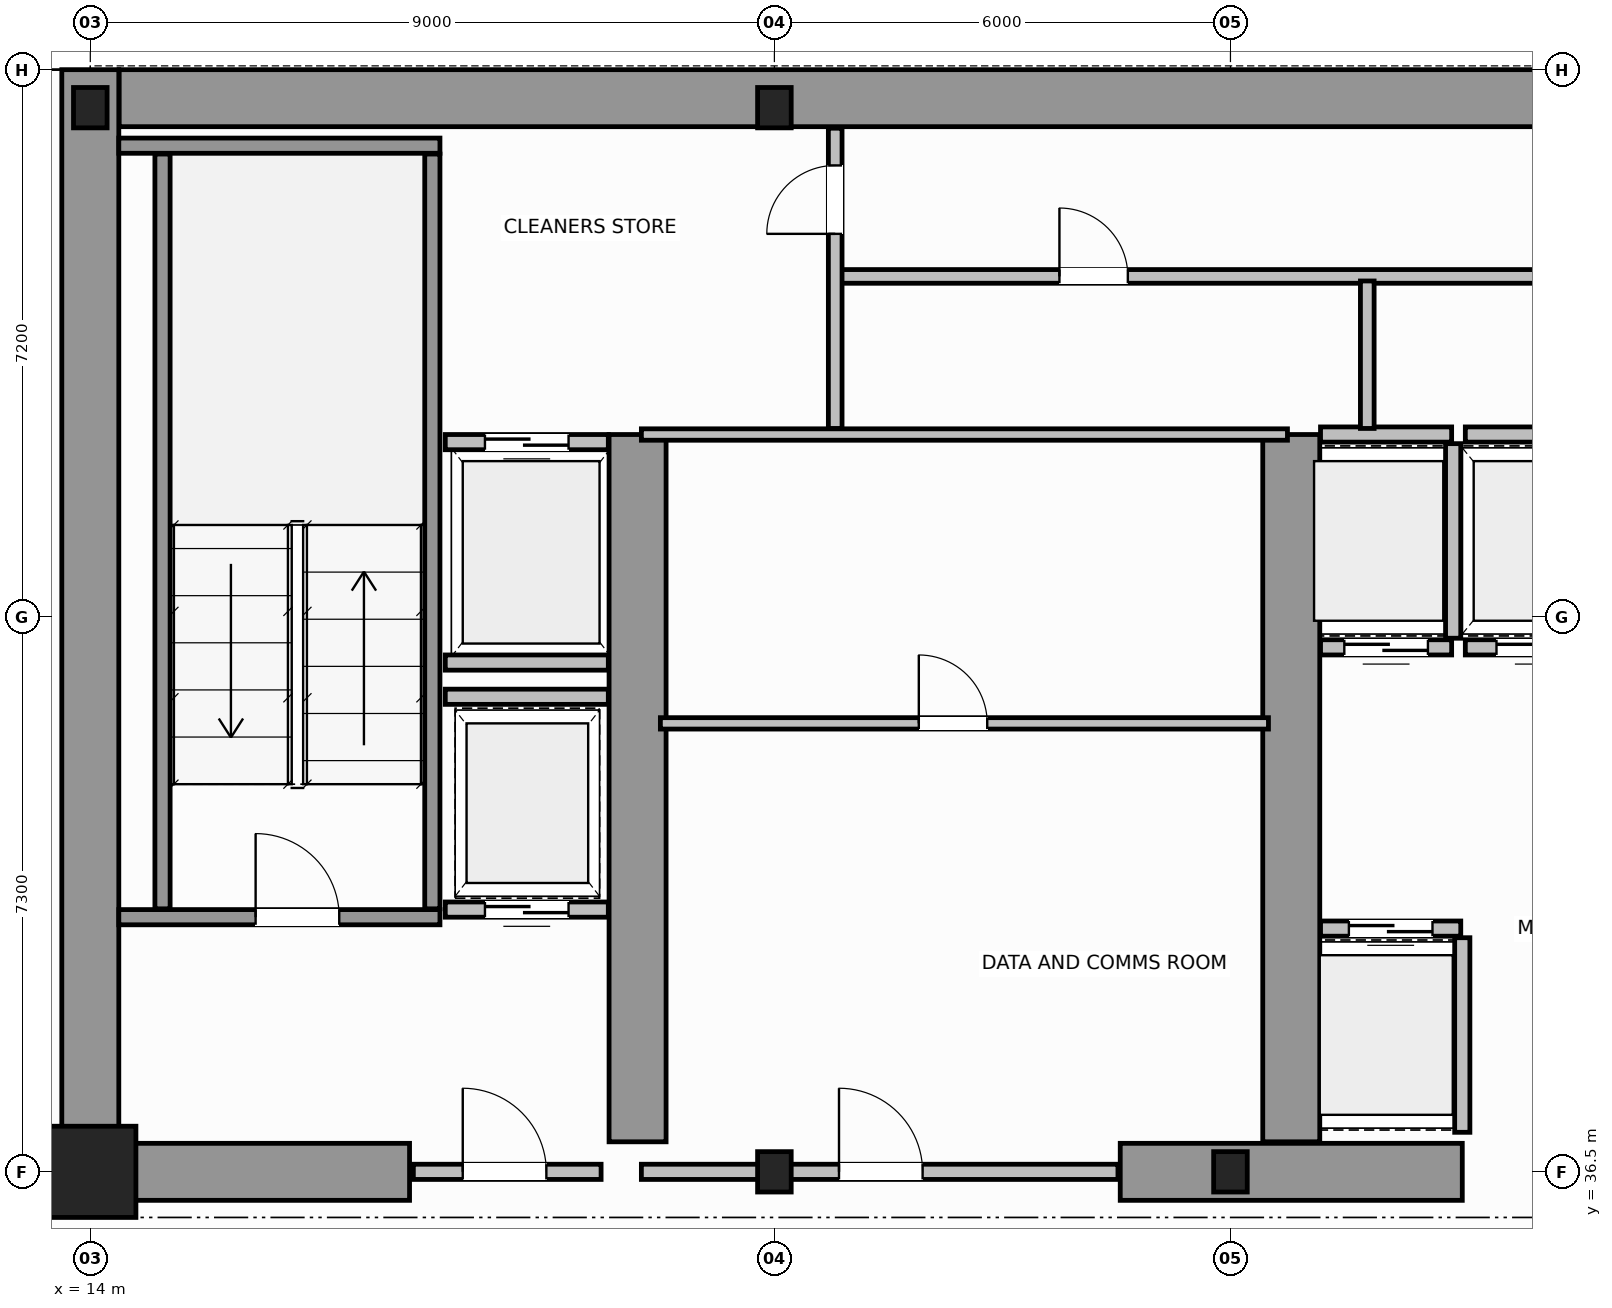
"""IFC4 building model, lengths in metres.
Left out: names, types, materials, properties, quantities, classifications, styles, units other than length and angle.
Written with IfcOpenShell. Run it as: python <this file> out.ifc"""

import sys

from ifc_helpers import new_model, si_unit, direction, frame, frame_2d, origin, origin_2d, place, context, subcontext, project, spatial, rectangle, i_section, extrude, source, transform, mapped, element, fill, save


model = new_model("IFC4")
c1 = context("Model", 3, precision=1e-05, world=origin(), true_north=direction((0.0, 1.0)))
c2 = subcontext(c1, "Body", "Model", "MODEL_VIEW")
j1 = project(units=[si_unit("LENGTHUNIT", "METRE"), si_unit("PLANEANGLEUNIT", "RADIAN")], contexts=[c1])
p1 = place(None, origin())
s1 = spatial("IfcSite", under=j1, at=p1, CompositionType="ELEMENT")
p2 = place(p1, origin())
s2 = spatial("IfcBuilding", under=s1, at=p2, CompositionType="ELEMENT")
p3 = place(p2, frame((0.0, 0.0, 137.6)))
s3 = spatial("IfcBuildingStorey", under=s2, at=p3, CompositionType="ELEMENT", Elevation=137.6)
m1 = source(origin(), c2, "Body", "SweptSolid", [
    extrude(rectangle(XDim=1.2, YDim=1.2, at=origin_2d()), origin(), (0.0, 0.0, 1.0), 3.8),
])
p4 = place(p3, frame((14.0, 36.5, 0.0), z_axis=(0.0, 0.0, 1.0), x_axis=(1.0, 0.0, 0.0)))
e1 = element("IfcColumn", 1, at=p4, inside=s3, PredefinedType="COLUMN", context=c2, shape_type="MappedRepresentation", body=[
    mapped(m1, transform((0.0, 0.0, 0.0), scale=1.0)),
])
m2 = source(origin(), c2, "Body", "SweptSolid", [
    extrude(i_section(OverallWidth=0.442, OverallDepth=0.531, WebThickness=0.065, FlangeThickness=0.076, FilletRadius=0.015, at=origin_2d()), origin(), (0.0, 0.0, 1.0), 3.8),
])
for number, where, z_axis, x_axis in (
    (2, (23.0, 36.5, 0.0), (0.0, 0.0, 1.0), (1.0, 0.0, 0.0)),
    (3, (29.0, 36.5, 0.0), (0.0, 0.0, 1.0), (1.0, 0.0, 0.0)),
    (4, (14.0, 50.5, 0.0), (0.0, 0.0, 1.0), (1.0, 0.0, 0.0)),
    (5, (23.0, 50.5, 0.0), (0.0, 0.0, 1.0), (1.0, 0.0, 0.0)),
):
    element("IfcColumn", number, at=place(p3, frame(where, z_axis=z_axis, x_axis=x_axis)), inside=s3, PredefinedType="COLUMN", context=c2, shape_type="MappedRepresentation", body=[
        mapped(m2, transform((0.0, 0.0, 0.0), scale=1.0)),
    ])
p5 = place(p3, frame((14.379, 50.625, 0.0), z_axis=(0.0, 0.0, 1.0), x_axis=(1.0, 0.0, 0.0)))
e6 = element("IfcWall", 6, at=p5, inside=s3, PredefinedType="SHEAR", context=c2, shape_type="SweptSolid", body=[
    extrude(rectangle(XDim=19.619, YDim=0.75, at=frame_2d((9.81, 0.0))), origin(), (0.0, 0.0, 1.0), 3.8),
])
p6 = place(p3, frame((14.0, 36.5, 0.0), z_axis=(0.0, 0.0, 1.0), x_axis=(0.0, 1.0, 0.0)))
e7 = element("IfcWall", 7, at=p6, inside=s3, PredefinedType="SHEAR", context=c2, shape_type="SweptSolid", body=[
    extrude(rectangle(XDim=14.5, YDim=0.75, at=frame_2d((7.25, 0.0))), origin(), (0.0, 0.0, 1.0), 3.8),
])
p7 = place(p3, frame((14.395, 36.5, 0.0), z_axis=(0.0, 0.0, 1.0), x_axis=(1.0, 0.0, 0.0)))
e8 = element("IfcWall", 8, at=p7, inside=s3, PredefinedType="SHEAR", context=c2, shape_type="SweptSolid", body=[
    extrude(rectangle(XDim=3.805, YDim=0.75, at=frame_2d((1.902, 0.0))), origin(), (0.0, 0.0, 1.0), 2.38),
])
p8 = place(p3, frame((27.55, 36.5, 0.0), z_axis=(0.0, 0.0, 1.0), x_axis=(1.0, 0.0, 0.0)))
e9 = element("IfcWall", 9, at=p8, inside=s3, PredefinedType="SHEAR", context=c2, shape_type="SweptSolid", body=[
    extrude(rectangle(XDim=4.5, YDim=0.75, at=frame_2d((2.25, 0.0))), origin(), (0.0, 0.0, 1.0), 3.8),
])
for number, where, z_axis, x_axis in (
    (10, (21.2, 36.895, 0.0), (0.0, 0.0, 1.0), (0.0, 1.0, 0.0)),
    (11, (29.8, 36.895, 0.0), (0.0, 0.0, 1.0), (0.0, 1.0, 0.0)),
):
    element("IfcWall", number, at=place(p3, frame(where, z_axis=z_axis, x_axis=x_axis)), inside=s3, PredefinedType="SHEAR", context=c2, shape_type="SweptSolid", body=[
        extrude(rectangle(XDim=9.305, YDim=0.75, at=frame_2d((4.652, 0.0))), origin(), (0.0, 0.0, 1.0), 3.8),
    ])
p9 = place(p3, frame((14.375, 39.85, 0.0), z_axis=(0.0, 0.0, 1.0), x_axis=(1.0, 0.0, 0.0)))
e12 = element("IfcWall", 12, at=p9, inside=s3, PredefinedType="SOLIDWALL", context=c2, shape_type="SweptSolid", body=[
    extrude(rectangle(XDim=4.225, YDim=0.2, at=frame_2d((2.113, 0.0))), origin(), (0.0, 0.0, 1.0), 3.8),
])
p10 = place(p9, frame((1.8, 0.0, 0.0)))
e13 = element("IfcOpeningElement", 13, at=p10, cuts=e12, PredefinedType="OPENING", context=c2, shape_type="SweptSolid", body=[
    extrude(rectangle(XDim=1.1, YDim=2.15, at=frame_2d((0.55, 1.075))), frame((0.0, 0.11, 0.0), z_axis=(0.0, -1.0, 0.0), x_axis=(1.0, 0.0, 0.0)), (0.0, 0.0, 1.0), 0.22),
])
p11 = place(p3, frame((14.375, 50.0, 0.0), z_axis=(0.0, 0.0, 1.0), x_axis=(1.0, 0.0, 0.0)))
e14 = element("IfcWall", 14, at=p11, inside=s3, PredefinedType="SOLIDWALL", context=c2, shape_type="SweptSolid", body=[
    extrude(rectangle(XDim=4.225, YDim=0.2, at=frame_2d((2.113, 0.0))), origin(), (0.0, 0.0, 1.0), 3.8),
])
for number, where, z_axis, x_axis in (
    (15, (14.95, 39.96, 0.0), (0.0, 0.0, 1.0), (0.0, 1.0, 0.0)),
    (16, (18.5, 39.96, 0.0), (0.0, 0.0, 1.0), (0.0, 1.0, 0.0)),
):
    element("IfcWall", number, at=place(p3, frame(where, z_axis=z_axis, x_axis=x_axis)), inside=s3, PredefinedType="SOLIDWALL", context=c2, shape_type="SweptSolid", body=[
        extrude(rectangle(XDim=9.93, YDim=0.2, at=frame_2d((4.965, 0.0))), origin(), (0.0, 0.0, 1.0), 3.8),
    ])
p12 = place(p3, frame((18.25, 36.5, 0.0), z_axis=(0.0, 0.0, 1.0), x_axis=(1.0, 0.0, 0.0)))
e17 = element("IfcWall", 17, at=p12, inside=s3, PredefinedType="SOLIDWALL", context=c2, shape_type="SweptSolid", body=[
    extrude(rectangle(XDim=2.47, YDim=0.2, at=frame_2d((1.235, 0.0))), origin(), (0.0, 0.0, 1.0), 2.37),
])
p13 = place(p12, frame((0.65, 0.0, 0.0)))
e18 = element("IfcOpeningElement", 18, at=p13, cuts=e17, PredefinedType="OPENING", context=c2, shape_type="SweptSolid", body=[
    extrude(rectangle(XDim=1.1, YDim=2.15, at=frame_2d((0.55, 1.075))), frame((0.0, 0.11, 0.0), z_axis=(0.0, -1.0, 0.0), x_axis=(1.0, 0.0, 0.0)), (0.0, 0.0, 1.0), 0.22),
])
p14 = place(p3, frame((30.185, 39.7, 0.0), z_axis=(0.0, 0.0, 1.0), x_axis=(1.0, 0.0, 0.0)))
e19 = element("IfcWall", 19, at=p14, inside=s3, PredefinedType="SOLIDWALL", context=c2, shape_type="SweptSolid", body=[
    extrude(rectangle(XDim=1.845, YDim=0.2, at=frame_2d((0.922, 0.0))), origin(), (0.0, 0.0, 1.0), 3.58),
])
p15 = place(p14, frame((0.373, 0.0, 0.0)))
e20 = element("IfcOpeningElement", 20, at=p15, cuts=e19, PredefinedType="OPENING", context=c2, shape_type="SweptSolid", body=[
    extrude(rectangle(XDim=1.1, YDim=2.15, at=frame_2d((0.55, 1.075))), frame((0.0, 0.11, 0.0), z_axis=(0.0, -1.0, 0.0), x_axis=(1.0, 0.0, 0.0)), (0.0, 0.0, 1.0), 0.22),
])
p16 = place(p3, frame((32.05, 37.02, 0.0), z_axis=(0.0, 0.0, 1.0), x_axis=(0.0, 1.0, 0.0)))
e21 = element("IfcWall", 21, at=p16, inside=s3, PredefinedType="SOLIDWALL", context=c2, shape_type="SweptSolid", body=[
    extrude(rectangle(XDim=2.56, YDim=0.2, at=frame_2d((1.28, 0.0))), origin(), (0.0, 0.0, 1.0), 3.58),
])
p17 = place(p3, frame((30.185, 43.4, 0.0), z_axis=(0.0, 0.0, 1.0), x_axis=(1.0, 0.0, 0.0)))
e22 = element("IfcWall", 22, at=p17, inside=s3, PredefinedType="SOLIDWALL", context=c2, shape_type="SweptSolid", body=[
    extrude(rectangle(XDim=1.725, YDim=0.2, at=frame_2d((0.862, 0.0))), origin(), (0.0, 0.0, 1.0), 3.58),
])
p18 = place(p17, frame((0.313, 0.0, 0.0)))
e23 = element("IfcOpeningElement", 23, at=p18, cuts=e22, PredefinedType="OPENING", context=c2, shape_type="SweptSolid", body=[
    extrude(rectangle(XDim=1.1, YDim=2.15, at=frame_2d((0.55, 1.075))), frame((0.0, 0.11, 0.0), z_axis=(0.0, -1.0, 0.0), x_axis=(1.0, 0.0, 0.0)), (0.0, 0.0, 1.0), 0.22),
])
p19 = place(p3, frame((30.185, 46.2, 0.0), z_axis=(0.0, 0.0, 1.0), x_axis=(1.0, 0.0, 0.0)))
e24 = element("IfcWall", 24, at=p19, inside=s3, PredefinedType="SOLIDWALL", context=c2, shape_type="SweptSolid", body=[
    extrude(rectangle(XDim=1.725, YDim=0.2, at=frame_2d((0.862, 0.0))), origin(), (0.0, 0.0, 1.0), 3.58),
])
p20 = place(p3, frame((31.93, 43.52, 0.0), z_axis=(0.0, 0.0, 1.0), x_axis=(0.0, 1.0, 0.0)))
e25 = element("IfcWall", 25, at=p20, inside=s3, PredefinedType="SOLIDWALL", context=c2, shape_type="SweptSolid", body=[
    extrude(rectangle(XDim=2.56, YDim=0.2, at=frame_2d((1.28, 0.0))), origin(), (0.0, 0.0, 1.0), 3.58),
])
p21 = place(p3, frame((32.09, 43.4, 0.0), z_axis=(0.0, 0.0, 1.0), x_axis=(1.0, 0.0, 0.0)))
e26 = element("IfcWall", 26, at=p21, inside=s3, PredefinedType="SOLIDWALL", context=c2, shape_type="SweptSolid", body=[
    extrude(rectangle(XDim=1.92, YDim=0.2, at=frame_2d((0.96, 0.0))), origin(), (0.0, 0.0, 1.0), 3.58),
])
p22 = place(p21, frame((0.41, 0.0, 0.0)))
e27 = element("IfcOpeningElement", 27, at=p22, cuts=e26, PredefinedType="OPENING", context=c2, shape_type="SweptSolid", body=[
    extrude(rectangle(XDim=1.1, YDim=2.15, at=frame_2d((0.55, 1.075))), frame((0.0, 0.11, 0.0), z_axis=(0.0, -1.0, 0.0), x_axis=(1.0, 0.0, 0.0)), (0.0, 0.0, 1.0), 0.22),
])
p23 = place(p3, frame((32.09, 46.2, 0.0), z_axis=(0.0, 0.0, 1.0), x_axis=(1.0, 0.0, 0.0)))
e28 = element("IfcWall", 28, at=p23, inside=s3, PredefinedType="SOLIDWALL", context=c2, shape_type="SweptSolid", body=[
    extrude(rectangle(XDim=1.92, YDim=0.2, at=frame_2d((0.96, 0.0))), origin(), (0.0, 0.0, 1.0), 3.58),
])
p24 = place(p3, frame((18.67, 46.1, 0.0), z_axis=(0.0, 0.0, 1.0), x_axis=(1.0, 0.0, 0.0)))
e29 = element("IfcWall", 29, at=p24, inside=s3, PredefinedType="SOLIDWALL", context=c2, shape_type="SweptSolid", body=[
    extrude(rectangle(XDim=2.145, YDim=0.2, at=frame_2d((1.073, 0.0))), origin(), (0.0, 0.0, 1.0), 3.58),
])
p25 = place(p24, frame((0.522, 0.0, 0.0)))
e30 = element("IfcOpeningElement", 30, at=p25, cuts=e29, PredefinedType="OPENING", context=c2, shape_type="SweptSolid", body=[
    extrude(rectangle(XDim=1.1, YDim=2.15, at=frame_2d((0.55, 1.075))), frame((0.0, 0.11, 0.0), z_axis=(0.0, -1.0, 0.0), x_axis=(1.0, 0.0, 0.0)), (0.0, 0.0, 1.0), 0.22),
])
p26 = place(p3, frame((18.67, 43.2, 0.0), z_axis=(0.0, 0.0, 1.0), x_axis=(1.0, 0.0, 0.0)))
e31 = element("IfcWall", 31, at=p26, inside=s3, PredefinedType="SOLIDWALL", context=c2, shape_type="SweptSolid", body=[
    extrude(rectangle(XDim=2.145, YDim=0.2, at=frame_2d((1.073, 0.0))), origin(), (0.0, 0.0, 1.0), 3.58),
])
p27 = place(p3, frame((18.67, 39.95, 0.0), z_axis=(0.0, 0.0, 1.0), x_axis=(1.0, 0.0, 0.0)))
e32 = element("IfcWall", 32, at=p27, inside=s3, PredefinedType="SOLIDWALL", context=c2, shape_type="SweptSolid", body=[
    extrude(rectangle(XDim=2.145, YDim=0.2, at=frame_2d((1.073, 0.0))), origin(), (0.0, 0.0, 1.0), 3.58),
])
p28 = place(p27, frame((0.522, 0.0, 0.0)))
e33 = element("IfcOpeningElement", 33, at=p28, cuts=e32, PredefinedType="OPENING", context=c2, shape_type="SweptSolid", body=[
    extrude(rectangle(XDim=1.1, YDim=2.15, at=frame_2d((0.55, 1.075))), frame((0.0, 0.11, 0.0), z_axis=(0.0, -1.0, 0.0), x_axis=(1.0, 0.0, 0.0)), (0.0, 0.0, 1.0), 0.22),
])
p29 = place(p3, frame((18.67, 42.75, 0.0), z_axis=(0.0, 0.0, 1.0), x_axis=(1.0, 0.0, 0.0)))
e34 = element("IfcWall", 34, at=p29, inside=s3, PredefinedType="SOLIDWALL", context=c2, shape_type="SweptSolid", body=[
    extrude(rectangle(XDim=2.145, YDim=0.2, at=frame_2d((1.073, 0.0))), origin(), (0.0, 0.0, 1.0), 3.58),
])
p30 = place(p3, frame((21.25, 36.5, 0.0), z_axis=(0.0, 0.0, 1.0), x_axis=(1.0, 0.0, 0.0)))
e35 = element("IfcWall", 35, at=p30, inside=s3, PredefinedType="SOLIDWALL", context=c2, shape_type="SweptSolid", body=[
    extrude(rectangle(XDim=6.27, YDim=0.2, at=frame_2d((3.135, 0.0))), origin(), (0.0, 0.0, 1.0), 2.37),
])
p31 = place(p30, frame((2.6, 0.0, 0.0)))
e36 = element("IfcOpeningElement", 36, at=p31, cuts=e35, PredefinedType="OPENING", context=c2, shape_type="SweptSolid", body=[
    extrude(rectangle(XDim=1.1, YDim=2.15, at=frame_2d((0.55, 1.075))), frame((0.0, 0.11, 0.0), z_axis=(0.0, -1.0, 0.0), x_axis=(1.0, 0.0, 0.0)), (0.0, 0.0, 1.0), 0.22),
])
p32 = place(p3, frame((21.25, 46.2, 0.0), z_axis=(0.0, 0.0, 1.0), x_axis=(1.0, 0.0, 0.0)))
e37 = element("IfcWall", 37, at=p32, inside=s3, PredefinedType="PARTITIONING", context=c2, shape_type="SweptSolid", body=[
    extrude(rectangle(XDim=8.5, YDim=0.15, at=frame_2d((4.25, 0.0))), origin(), (0.0, 0.0, 1.0), 3.58),
])
p33 = place(p3, frame((21.5, 42.4, 0.0), z_axis=(0.0, 0.0, 1.0), x_axis=(1.0, 0.0, 0.0)))
e38 = element("IfcWall", 38, at=p33, inside=s3, PredefinedType="PARTITIONING", context=c2, shape_type="SweptSolid", body=[
    extrude(rectangle(XDim=8.0, YDim=0.15, at=frame_2d((4.0, 0.0))), origin(), (0.0, 0.0, 1.0), 3.58),
])
p34 = place(p33, frame((3.4, 0.0, 0.0)))
e39 = element("IfcOpeningElement", 39, at=p34, cuts=e38, PredefinedType="OPENING", context=c2, shape_type="SweptSolid", body=[
    extrude(rectangle(XDim=0.9, YDim=2.1, at=frame_2d((0.45, 1.05))), frame((0.0, 0.085, 0.0), z_axis=(0.0, -1.0, 0.0), x_axis=(1.0, 0.0, 0.0)), (0.0, 0.0, 1.0), 0.17),
])
p35 = place(p3, frame((23.85, 48.28, 0.0), z_axis=(0.0, 0.0, 1.0), x_axis=(1.0, 0.0, 0.0)))
e40 = element("IfcWall", 40, at=p35, inside=s3, PredefinedType="PLUMBINGWALL", context=c2, shape_type="SweptSolid", body=[
    extrude(rectangle(XDim=15.03, YDim=0.18, at=frame_2d((7.515, 0.0))), origin(), (0.0, 0.0, 1.0), 3.58),
])
p36 = place(p35, frame((2.9, 0.0, 0.0)))
e41 = element("IfcOpeningElement", 41, at=p36, cuts=e40, PredefinedType="OPENING", context=c2, shape_type="SweptSolid", body=[
    extrude(rectangle(XDim=0.9, YDim=2.15, at=frame_2d((0.45, 1.075))), frame((0.0, 0.1, 0.0), z_axis=(0.0, -1.0, 0.0), x_axis=(1.0, 0.0, 0.0)), (0.0, 0.0, 1.0), 0.2),
])
p37 = place(p35, frame((10.4, 0.0, 0.0)))
e42 = element("IfcOpeningElement", 42, at=p37, cuts=e40, PredefinedType="OPENING", context=c2, shape_type="SweptSolid", body=[
    extrude(rectangle(XDim=0.9, YDim=2.15, at=frame_2d((0.45, 1.075))), frame((0.0, 0.1, 0.0), z_axis=(0.0, -1.0, 0.0), x_axis=(1.0, 0.0, 0.0)), (0.0, 0.0, 1.0), 0.2),
])
p38 = place(p3, frame((23.8, 46.28, 0.0), z_axis=(0.0, 0.0, 1.0), x_axis=(0.0, 1.0, 0.0)))
e43 = element("IfcWall", 43, at=p38, inside=s3, PredefinedType="PLUMBINGWALL", context=c2, shape_type="SweptSolid", body=[
    extrude(rectangle(XDim=3.95, YDim=0.18, at=frame_2d((1.975, 0.0))), origin(), (0.0, 0.0, 1.0), 3.58),
])
p39 = place(p38, frame((2.56, 0.0, 0.0)))
e44 = element("IfcOpeningElement", 44, at=p39, cuts=e43, PredefinedType="OPENING", context=c2, shape_type="SweptSolid", body=[
    extrude(rectangle(XDim=0.9, YDim=2.15, at=frame_2d((0.45, 1.075))), frame((0.0, 0.1, 0.0), z_axis=(0.0, -1.0, 0.0), x_axis=(1.0, 0.0, 0.0)), (0.0, 0.0, 1.0), 0.2),
])
p40 = place(p3, frame((30.8, 46.28, 0.0), z_axis=(0.0, 0.0, 1.0), x_axis=(0.0, 1.0, 0.0)))
e45 = element("IfcWall", 45, at=p40, inside=s3, PredefinedType="PLUMBINGWALL", context=c2, shape_type="SweptSolid", body=[
    extrude(rectangle(XDim=1.94, YDim=0.18, at=frame_2d((0.97, 0.0))), origin(), (0.0, 0.0, 1.0), 3.58),
])
p41 = place(p3, frame((7.264, 36.48, 0.0), z_axis=(0.0, 0.0, 1.0), x_axis=(1.0, 0.0, 0.0)))
e46 = element("IfcWall", 46, at=p41, inside=s3, PredefinedType="PARTITIONING", context=c2, shape_type="SweptSolid", body=[
    extrude(rectangle(XDim=6.676, YDim=0.12, at=frame_2d((3.338, 0.0))), origin(), (0.0, 0.0, 1.0), 2.87),
])
p42 = place(p41, frame((2.888, 0.0, 0.0)))
e47 = element("IfcOpeningElement", 47, at=p42, cuts=e46, PredefinedType="OPENING", context=c2, shape_type="SweptSolid", body=[
    extrude(rectangle(XDim=0.9, YDim=2.15, at=frame_2d((0.45, 1.075))), frame((0.0, 0.07, 0.0), z_axis=(0.0, -1.0, 0.0), x_axis=(1.0, 0.0, 0.0)), (0.0, 0.0, 1.0), 0.14),
])
m3 = source(origin(), c2, "Body", "SweptSolid", [
    extrude(rectangle(XDim=1.1, YDim=2.15, at=frame_2d((0.55, 1.075))), frame((0.0, 0.025, 0.0), z_axis=(0.0, -1.0, 0.0), x_axis=(1.0, 0.0, 0.0)), (0.0, 0.0, 1.0), 0.05),
])
p43 = place(p10, origin())
e48 = element("IfcDoor", 48, at=p43, inside=s3, OperationType="SINGLE_SWING_LEFT", PredefinedType="DOOR", context=c2, shape_type="MappedRepresentation", body=[
    mapped(m3, transform((0.0, 0.0, 0.0), scale=1.0)),
])
fill(e13, e48)
p44 = place(p13, origin())
e49 = element("IfcDoor", 49, at=p44, inside=s3, OperationType="SINGLE_SWING_RIGHT", PredefinedType="DOOR", context=c2, shape_type="MappedRepresentation", body=[
    mapped(m3, transform((0.0, 0.0, 0.0), scale=1.0)),
])
fill(e18, e49)
p45 = place(p15, origin())
e50 = element("IfcDoor", 50, at=p45, inside=s3, OperationType="DOUBLE_DOOR_SLIDING", PredefinedType="DOOR", context=c2, shape_type="MappedRepresentation", body=[
    mapped(m3, transform((0.0, 0.0, 0.0), scale=1.0)),
])
fill(e20, e50)
p46 = place(p18, origin())
e51 = element("IfcDoor", 51, at=p46, inside=s3, OperationType="DOUBLE_DOOR_SLIDING", PredefinedType="DOOR", context=c2, shape_type="MappedRepresentation", body=[
    mapped(m3, transform((0.0, 0.0, 0.0), scale=1.0)),
])
fill(e23, e51)
p47 = place(p22, origin())
e52 = element("IfcDoor", 52, at=p47, inside=s3, OperationType="DOUBLE_DOOR_SLIDING", PredefinedType="DOOR", context=c2, shape_type="MappedRepresentation", body=[
    mapped(m3, transform((0.0, 0.0, 0.0), scale=1.0)),
])
fill(e27, e52)
p48 = place(p25, origin())
e53 = element("IfcDoor", 53, at=p48, inside=s3, OperationType="DOUBLE_DOOR_SLIDING", PredefinedType="DOOR", context=c2, shape_type="MappedRepresentation", body=[
    mapped(m3, transform((0.0, 0.0, 0.0), scale=1.0)),
])
fill(e30, e53)
p49 = place(p28, origin())
e54 = element("IfcDoor", 54, at=p49, inside=s3, OperationType="DOUBLE_DOOR_SLIDING", PredefinedType="DOOR", context=c2, shape_type="MappedRepresentation", body=[
    mapped(m3, transform((0.0, 0.0, 0.0), scale=1.0)),
])
fill(e33, e54)
p50 = place(p31, origin())
e55 = element("IfcDoor", 55, at=p50, inside=s3, OperationType="SINGLE_SWING_LEFT", PredefinedType="DOOR", context=c2, shape_type="MappedRepresentation", body=[
    mapped(m3, transform((0.0, 0.0, 0.0), scale=1.0)),
])
fill(e36, e55)
m4 = source(origin(), c2, "Body", "SweptSolid", [
    extrude(rectangle(XDim=0.9, YDim=2.1, at=frame_2d((0.45, 1.05))), frame((0.0, 0.025, 0.0), z_axis=(0.0, -1.0, 0.0), x_axis=(1.0, 0.0, 0.0)), (0.0, 0.0, 1.0), 0.05),
])
p51 = place(p34, origin())
e56 = element("IfcDoor", 56, at=p51, inside=s3, OperationType="SINGLE_SWING_RIGHT", PredefinedType="DOOR", context=c2, shape_type="MappedRepresentation", body=[
    mapped(m4, transform((0.0, 0.0, 0.0), scale=1.0)),
])
fill(e39, e56)
m5 = source(origin(), c2, "Body", "SweptSolid", [
    extrude(rectangle(XDim=0.9, YDim=2.15, at=frame_2d((0.45, 1.075))), frame((0.0, 0.025, 0.0), z_axis=(0.0, -1.0, 0.0), x_axis=(1.0, 0.0, 0.0)), (0.0, 0.0, 1.0), 0.05),
])
p52 = place(p39, origin())
e57 = element("IfcDoor", 57, at=p52, inside=s3, OperationType="SINGLE_SWING_LEFT", PredefinedType="DOOR", context=c2, shape_type="MappedRepresentation", body=[
    mapped(m5, transform((0.0, 0.0, 0.0), scale=1.0)),
])
fill(e44, e57)
p53 = place(p36, origin())
e58 = element("IfcDoor", 58, at=p53, inside=s3, OperationType="SINGLE_SWING_RIGHT", PredefinedType="DOOR", context=c2, shape_type="MappedRepresentation", body=[
    mapped(m5, transform((0.0, 0.0, 0.0), scale=1.0)),
])
fill(e41, e58)
save(model, sys.argv[1])
